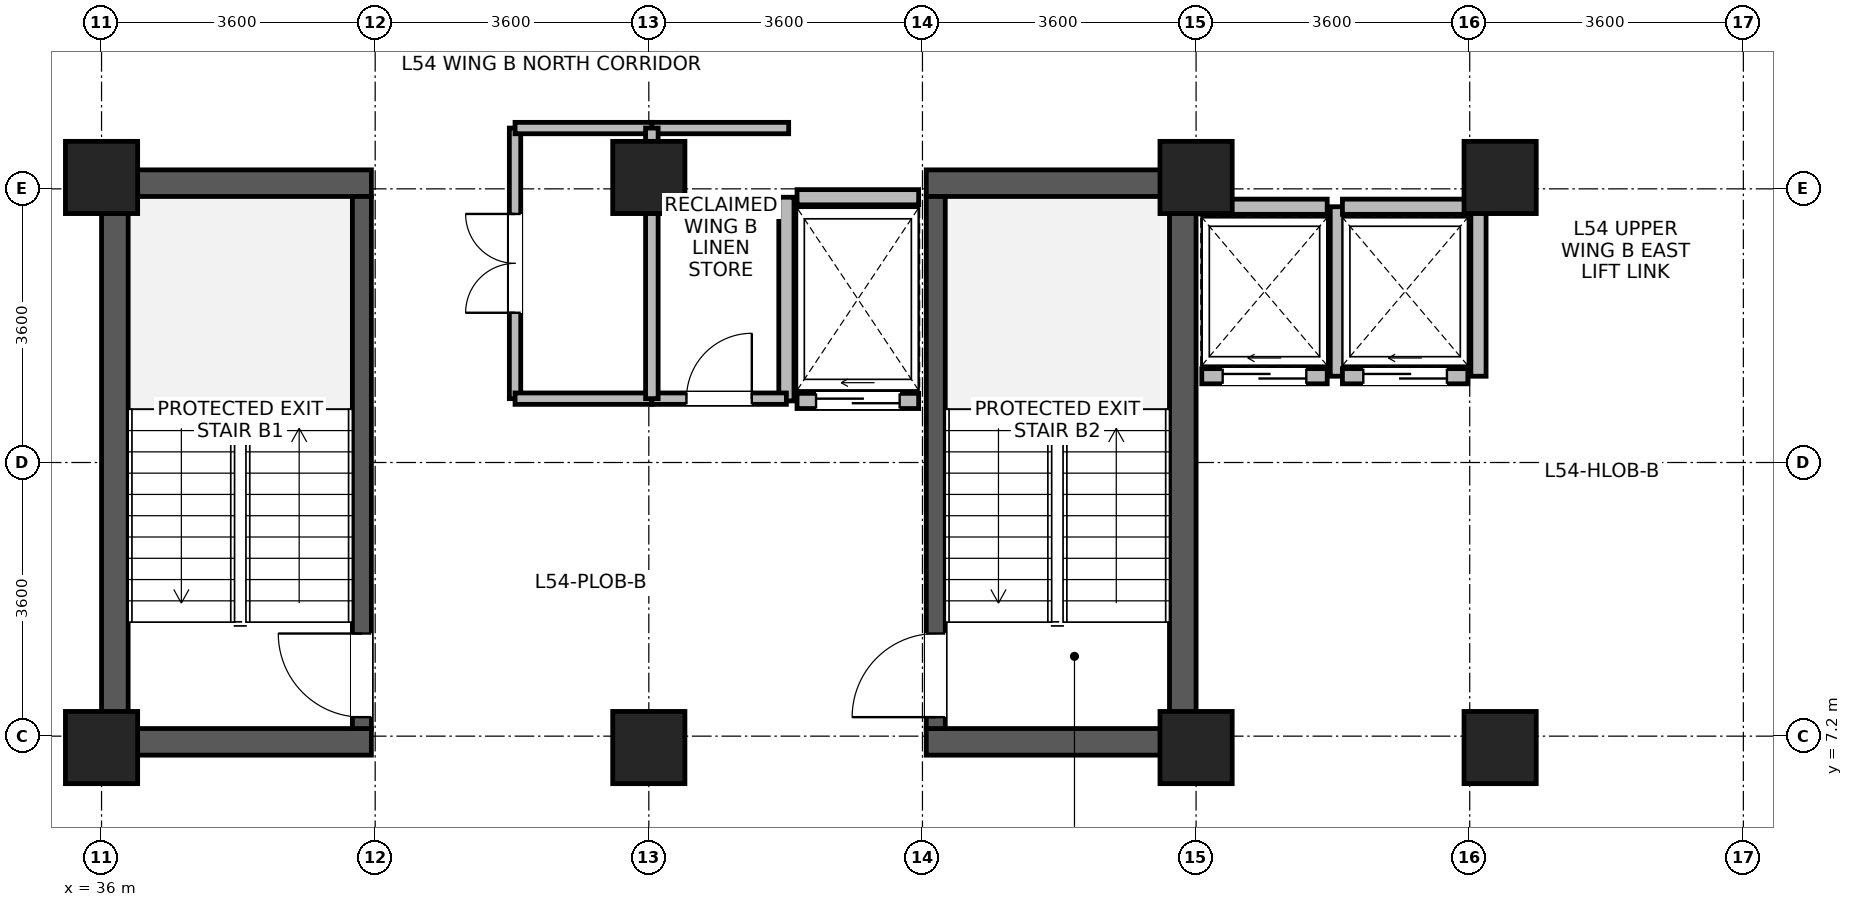
"""IFC4 building model, lengths in metres.
Left out: names, types, materials, properties, quantities, classifications, styles, units other than length and angle.
Written with IfcOpenShell. Run it as: python <this file> out.ifc"""

import sys

from ifc_helpers import new_model, si_unit, direction, frame, frame_2d, origin, origin_2d, place, context, subcontext, project, spatial, rectangle, extrude, source, transform, mapped, element, fill, save


model = new_model("IFC4")
c1 = context("Model", 3, precision=1e-05, world=origin(), true_north=direction((0.0, 1.0)))
c2 = subcontext(c1, "Body", "Model", "MODEL_VIEW")
j1 = project(units=[si_unit("LENGTHUNIT", "METRE"), si_unit("PLANEANGLEUNIT", "RADIAN")], contexts=[c1])
p1 = place(None, origin())
s1 = spatial("IfcSite", under=j1, at=p1, CompositionType="ELEMENT")
p2 = place(p1, origin())
s2 = spatial("IfcBuilding", under=s1, at=p2, CompositionType="ELEMENT")
p3 = place(p2, frame((0.0, 0.0, 212.9)))
s3 = spatial("IfcBuildingStorey", under=s2, at=p3, CompositionType="ELEMENT", Elevation=212.9)
for number, where, z_axis, x_axis in (
    (1, (36.175, 6.95, 0.0), (0.0, 0.0, 1.0), (0.0, 1.0, 0.0)),
    (2, (50.225, 6.95, 0.0), (0.0, 0.0, 1.0), (0.0, 1.0, 0.0)),
):
    element("IfcWall", number, at=place(p3, frame(where, z_axis=z_axis, x_axis=x_axis)), inside=s3, PredefinedType="SHEAR", context=c2, shape_type="SweptSolid", body=[
        extrude(rectangle(XDim=7.7, YDim=0.35, at=frame_2d((3.85, 0.0))), origin(), (0.0, 0.0, 1.0), 3.47),
    ])
for number, where, z_axis, x_axis in (
    (3, (36.35, 7.125, 0.0), (0.0, 0.0, 1.0), (1.0, 0.0, 0.0)),
    (4, (46.85, 7.125, 0.0), (0.0, 0.0, 1.0), (1.0, 0.0, 0.0)),
    (5, (36.35, 14.475, 0.0), (0.0, 0.0, 1.0), (1.0, 0.0, 0.0)),
    (6, (46.85, 14.475, 0.0), (0.0, 0.0, 1.0), (1.0, 0.0, 0.0)),
):
    element("IfcWall", number, at=place(p3, frame(where, z_axis=z_axis, x_axis=x_axis)), inside=s3, PredefinedType="SHEAR", context=c2, shape_type="SweptSolid", body=[
        extrude(rectangle(XDim=3.2, YDim=0.35, at=frame_2d((1.6, 0.0))), origin(), (0.0, 0.0, 1.0), 3.47),
    ])
p4 = place(p3, frame((39.425, 7.3, 0.0), z_axis=(0.0, 0.0, 1.0), x_axis=(0.0, 1.0, 0.0)))
e7 = element("IfcWall", 7, at=p4, inside=s3, PredefinedType="SHEAR", context=c2, shape_type="SweptSolid", body=[
    extrude(rectangle(XDim=7.0, YDim=0.25, at=frame_2d((3.5, 0.0))), origin(), (0.0, 0.0, 1.0), 3.47),
])
p5 = place(p4, frame((0.15, 0.0, 0.0)))
e8 = element("IfcOpeningElement", 8, at=p5, cuts=e7, PredefinedType="OPENING", context=c2, shape_type="SweptSolid", body=[
    extrude(rectangle(XDim=1.1, YDim=2.08, at=frame_2d((0.55, 1.04))), frame((0.0, 0.135, 0.0), z_axis=(0.0, -1.0, 0.0), x_axis=(1.0, 0.0, 0.0)), (0.0, 0.0, 1.0), 0.27),
])
p6 = place(p3, frame((46.975, 7.3, 0.0), z_axis=(0.0, 0.0, 1.0), x_axis=(0.0, 1.0, 0.0)))
e9 = element("IfcWall", 9, at=p6, inside=s3, PredefinedType="SHEAR", context=c2, shape_type="SweptSolid", body=[
    extrude(rectangle(XDim=7.0, YDim=0.25, at=frame_2d((3.5, 0.0))), origin(), (0.0, 0.0, 1.0), 3.47),
])
p7 = place(p6, frame((0.15, 0.0, 0.0)))
e10 = element("IfcOpeningElement", 10, at=p7, cuts=e9, PredefinedType="OPENING", context=c2, shape_type="SweptSolid", body=[
    extrude(rectangle(XDim=1.1, YDim=2.08, at=frame_2d((0.55, 1.04))), frame((0.0, 0.135, 0.0), z_axis=(0.0, -1.0, 0.0), x_axis=(1.0, 0.0, 0.0)), (0.0, 0.0, 1.0), 0.27),
])
m1 = source(origin(), c2, "Body", "SweptSolid", [
    extrude(rectangle(XDim=0.95, YDim=0.95, at=origin_2d()), origin(), (0.0, 0.0, 1.0), 3.7),
])
for number, where, z_axis, x_axis in (
    (11, (36.0, 7.05, 0.0), (0.0, 0.0, 1.0), (1.0, 0.0, 0.0)),
    (12, (36.0, 14.55, 0.0), (0.0, 0.0, 1.0), (1.0, 0.0, 0.0)),
    (13, (43.2, 7.05, 0.0), (0.0, 0.0, 1.0), (1.0, 0.0, 0.0)),
    (14, (43.2, 14.55, 0.0), (0.0, 0.0, 1.0), (1.0, 0.0, 0.0)),
    (15, (50.4, 7.05, 0.0), (0.0, 0.0, 1.0), (1.0, 0.0, 0.0)),
    (16, (50.4, 14.55, 0.0), (0.0, 0.0, 1.0), (1.0, 0.0, 0.0)),
    (17, (54.4, 7.05, 0.0), (0.0, 0.0, 1.0), (1.0, 0.0, 0.0)),
    (18, (54.4, 14.55, 0.0), (0.0, 0.0, 1.0), (1.0, 0.0, 0.0)),
):
    element("IfcColumn", number, at=place(p3, frame(where, z_axis=z_axis, x_axis=x_axis)), inside=s3, PredefinedType="COLUMN", context=c2, shape_type="MappedRepresentation", body=[
        mapped(m1, transform((0.0, 0.0, 0.0), x_axis=(1.0, 0.0, 0.0), y_axis=(0.0, 1.0, 0.0), z_axis=(0.0, 0.0, 1.0), scale=1.0)),
    ])
p8 = place(p3, frame((50.475, 11.935, 0.0), z_axis=(0.0, 0.0, 1.0), x_axis=(1.0, 0.0, 0.0)))
e19 = element("IfcWall", 19, at=p8, inside=s3, PredefinedType="PARTITIONING", context=c2, shape_type="SweptSolid", body=[
    extrude(rectangle(XDim=1.65, YDim=0.2, at=frame_2d((0.825, 0.0))), origin(), (0.0, 0.0, 1.0), 3.45),
])
p9 = place(p8, frame((0.275, 0.0, 0.0)))
e20 = element("IfcOpeningElement", 20, at=p9, cuts=e19, PredefinedType="OPENING", context=c2, shape_type="SweptSolid", body=[
    extrude(rectangle(XDim=1.1, YDim=2.12, at=frame_2d((0.55, 1.06))), frame((0.0, 0.11, 0.0), z_axis=(0.0, -1.0, 0.0), x_axis=(1.0, 0.0, 0.0)), (0.0, 0.0, 1.0), 0.22),
])
p10 = place(p3, frame((50.475, 14.165, 0.0), z_axis=(0.0, 0.0, 1.0), x_axis=(1.0, 0.0, 0.0)))
e21 = element("IfcWall", 21, at=p10, inside=s3, PredefinedType="PARTITIONING", context=c2, shape_type="SweptSolid", body=[
    extrude(rectangle(XDim=1.65, YDim=0.2, at=frame_2d((0.825, 0.0))), origin(), (0.0, 0.0, 1.0), 3.45),
])
p11 = place(p3, frame((52.265, 11.935, 0.0), z_axis=(0.0, 0.0, 1.0), x_axis=(0.0, 1.0, 0.0)))
e22 = element("IfcWall", 22, at=p11, inside=s3, PredefinedType="PARTITIONING", context=c2, shape_type="SweptSolid", body=[
    extrude(rectangle(XDim=2.23, YDim=0.2, at=frame_2d((1.115, 0.0))), origin(), (0.0, 0.0, 1.0), 3.45),
])
p12 = place(p3, frame((52.325, 11.935, 0.0), z_axis=(0.0, 0.0, 1.0), x_axis=(1.0, 0.0, 0.0)))
e23 = element("IfcWall", 23, at=p12, inside=s3, PredefinedType="PARTITIONING", context=c2, shape_type="SweptSolid", body=[
    extrude(rectangle(XDim=1.65, YDim=0.2, at=frame_2d((0.825, 0.0))), origin(), (0.0, 0.0, 1.0), 3.45),
])
p13 = place(p12, frame((0.275, 0.0, 0.0)))
e24 = element("IfcOpeningElement", 24, at=p13, cuts=e23, PredefinedType="OPENING", context=c2, shape_type="SweptSolid", body=[
    extrude(rectangle(XDim=1.1, YDim=2.12, at=frame_2d((0.55, 1.06))), frame((0.0, 0.11, 0.0), z_axis=(0.0, -1.0, 0.0), x_axis=(1.0, 0.0, 0.0)), (0.0, 0.0, 1.0), 0.22),
])
p14 = place(p3, frame((52.325, 14.165, 0.0), z_axis=(0.0, 0.0, 1.0), x_axis=(1.0, 0.0, 0.0)))
e25 = element("IfcWall", 25, at=p14, inside=s3, PredefinedType="PARTITIONING", context=c2, shape_type="SweptSolid", body=[
    extrude(rectangle(XDim=1.65, YDim=0.2, at=frame_2d((0.825, 0.0))), origin(), (0.0, 0.0, 1.0), 3.45),
])
p15 = place(p3, frame((54.115, 11.935, 0.0), z_axis=(0.0, 0.0, 1.0), x_axis=(0.0, 1.0, 0.0)))
e26 = element("IfcWall", 26, at=p15, inside=s3, PredefinedType="PARTITIONING", context=c2, shape_type="SweptSolid", body=[
    extrude(rectangle(XDim=2.23, YDim=0.2, at=frame_2d((1.115, 0.0))), origin(), (0.0, 0.0, 1.0), 3.45),
])
p16 = place(p3, frame((45.15, 11.61, 0.0), z_axis=(0.0, 0.0, 1.0), x_axis=(1.0, 0.0, 0.0)))
e27 = element("IfcWall", 27, at=p16, inside=s3, PredefinedType="PARTITIONING", context=c2, shape_type="SweptSolid", body=[
    extrude(rectangle(XDim=1.6, YDim=0.2, at=frame_2d((0.8, 0.0))), origin(), (0.0, 0.0, 1.0), 3.45),
])
p17 = place(p16, frame((0.25, 0.0, 0.0)))
e28 = element("IfcOpeningElement", 28, at=p17, cuts=e27, PredefinedType="OPENING", context=c2, shape_type="SweptSolid", body=[
    extrude(rectangle(XDim=1.1, YDim=2.12, at=frame_2d((0.55, 1.06))), frame((0.0, 0.11, 0.0), z_axis=(0.0, -1.0, 0.0), x_axis=(1.0, 0.0, 0.0)), (0.0, 0.0, 1.0), 0.22),
])
p18 = place(p3, frame((45.15, 14.29, 0.0), z_axis=(0.0, 0.0, 1.0), x_axis=(1.0, 0.0, 0.0)))
e29 = element("IfcWall", 29, at=p18, inside=s3, PredefinedType="PARTITIONING", context=c2, shape_type="SweptSolid", body=[
    extrude(rectangle(XDim=1.6, YDim=0.2, at=frame_2d((0.8, 0.0))), origin(), (0.0, 0.0, 1.0), 2.55),
])
p19 = place(p3, frame((45.01, 11.61, 0.0), z_axis=(0.0, 0.0, 1.0), x_axis=(0.0, 1.0, 0.0)))
e30 = element("IfcWall", 30, at=p19, inside=s3, PredefinedType="PARTITIONING", context=c2, shape_type="SweptSolid", body=[
    extrude(rectangle(XDim=2.68, YDim=0.2, at=frame_2d((1.34, 0.0))), origin(), (0.0, 0.0, 1.0), 3.45),
])
p20 = place(p3, frame((41.44, 11.64, 0.0), z_axis=(0.0, 0.0, 1.0), x_axis=(0.0, 1.0, 0.0)))
e31 = element("IfcWall", 31, at=p20, inside=s3, PredefinedType="PARTITIONING", context=c2, shape_type="SweptSolid", body=[
    extrude(rectangle(XDim=3.56, YDim=0.15, at=frame_2d((1.78, 0.0))), origin(), (0.0, 0.0, 1.0), 3.45),
])
p21 = place(p20, frame((1.13, 0.0, 0.0)))
e32 = element("IfcOpeningElement", 32, at=p21, cuts=e31, PredefinedType="OPENING", context=c2, shape_type="SweptSolid", body=[
    extrude(rectangle(XDim=1.3, YDim=2.12, at=frame_2d((0.65, 1.06))), frame((0.0, 0.085, 0.0), z_axis=(0.0, -1.0, 0.0), x_axis=(1.0, 0.0, 0.0)), (0.0, 0.0, 1.0), 0.17),
])
for number, where, z_axis, x_axis in (
    (33, (41.44, 11.64, 0.0), (0.0, 0.0, 1.0), (1.0, 0.0, 0.0)),
    (34, (41.44, 15.2, 0.0), (0.0, 0.0, 1.0), (1.0, 0.0, 0.0)),
):
    element("IfcWall", number, at=place(p3, frame(where, z_axis=z_axis, x_axis=x_axis)), inside=s3, PredefinedType="PARTITIONING", context=c2, shape_type="SweptSolid", body=[
        extrude(rectangle(XDim=1.8, YDim=0.15, at=frame_2d((0.9, 0.0))), origin(), (0.0, 0.0, 1.0), 3.45),
    ])
p22 = place(p3, frame((43.24, 11.64, 0.0), z_axis=(0.0, 0.0, 1.0), x_axis=(1.0, 0.0, 0.0)))
e35 = element("IfcWall", 35, at=p22, inside=s3, PredefinedType="PARTITIONING", context=c2, shape_type="SweptSolid", body=[
    extrude(rectangle(XDim=1.77, YDim=0.15, at=frame_2d((0.885, 0.0))), origin(), (0.0, 0.0, 1.0), 3.45),
])
p23 = place(p22, frame((0.455, 0.0, 0.0)))
e36 = element("IfcOpeningElement", 36, at=p23, cuts=e35, PredefinedType="OPENING", context=c2, shape_type="SweptSolid", body=[
    extrude(rectangle(XDim=0.86, YDim=2.02, at=frame_2d((0.43, 1.01))), frame((0.0, 0.085, 0.0), z_axis=(0.0, -1.0, 0.0), x_axis=(1.0, 0.0, 0.0)), (0.0, 0.0, 1.0), 0.17),
])
p24 = place(p3, frame((43.24, 15.2, 0.0), z_axis=(0.0, 0.0, 1.0), x_axis=(1.0, 0.0, 0.0)))
e37 = element("IfcWall", 37, at=p24, inside=s3, PredefinedType="PARTITIONING", context=c2, shape_type="SweptSolid", body=[
    extrude(rectangle(XDim=1.8, YDim=0.15, at=frame_2d((0.9, 0.0))), origin(), (0.0, 0.0, 1.0), 3.45),
])
p25 = place(p3, frame((43.24, 11.64, 0.0), z_axis=(0.0, 0.0, 1.0), x_axis=(0.0, 1.0, 0.0)))
e38 = element("IfcWall", 38, at=p25, inside=s3, PredefinedType="PARTITIONING", context=c2, shape_type="SweptSolid", body=[
    extrude(rectangle(XDim=3.56, YDim=0.165, at=frame_2d((1.78, 0.0))), origin(), (0.0, 0.0, 1.0), 3.45),
])
p26 = place(p5, origin())
e39 = element("IfcDoor", 39, at=p26, inside=s3, OperationType="SINGLE_SWING_RIGHT", PredefinedType="DOOR", context=c2, shape_type="SweptSolid", body=[
    extrude(rectangle(XDim=1.1, YDim=2.08, at=frame_2d((0.55, 1.04))), frame((0.0, 0.025, 0.0), z_axis=(0.0, -1.0, 0.0), x_axis=(1.0, 0.0, 0.0)), (0.0, 0.0, 1.0), 0.05),
])
fill(e8, e39)
p27 = place(p7, origin())
e40 = element("IfcDoor", 40, at=p27, inside=s3, OperationType="SINGLE_SWING_LEFT", PredefinedType="DOOR", context=c2, shape_type="SweptSolid", body=[
    extrude(rectangle(XDim=1.1, YDim=2.08, at=frame_2d((0.55, 1.04))), frame((0.0, 0.025, 0.0), z_axis=(0.0, -1.0, 0.0), x_axis=(1.0, 0.0, 0.0)), (0.0, 0.0, 1.0), 0.05),
])
fill(e10, e40)
p28 = place(p9, origin())
e41 = element("IfcDoor", 41, at=p28, inside=s3, OperationType="SLIDING_TO_LEFT", PredefinedType="DOOR", context=c2, shape_type="SweptSolid", body=[
    extrude(rectangle(XDim=1.1, YDim=2.12, at=frame_2d((0.55, 1.06))), frame((0.0, 0.025, 0.0), z_axis=(0.0, -1.0, 0.0), x_axis=(1.0, 0.0, 0.0)), (0.0, 0.0, 1.0), 0.05),
])
fill(e20, e41)
p29 = place(p13, origin())
e42 = element("IfcDoor", 42, at=p29, inside=s3, OperationType="SLIDING_TO_LEFT", PredefinedType="DOOR", context=c2, shape_type="SweptSolid", body=[
    extrude(rectangle(XDim=1.1, YDim=2.12, at=frame_2d((0.55, 1.06))), frame((0.0, 0.025, 0.0), z_axis=(0.0, -1.0, 0.0), x_axis=(1.0, 0.0, 0.0)), (0.0, 0.0, 1.0), 0.05),
])
fill(e24, e42)
p30 = place(p17, origin())
e43 = element("IfcDoor", 43, at=p30, inside=s3, OperationType="SLIDING_TO_LEFT", PredefinedType="DOOR", context=c2, shape_type="SweptSolid", body=[
    extrude(rectangle(XDim=1.1, YDim=2.12, at=frame_2d((0.55, 1.06))), frame((0.0, 0.025, 0.0), z_axis=(0.0, -1.0, 0.0), x_axis=(1.0, 0.0, 0.0)), (0.0, 0.0, 1.0), 0.05),
])
fill(e28, e43)
p31 = place(p21, origin())
e44 = element("IfcDoor", 44, at=p31, inside=s3, OperationType="DOUBLE_DOOR_SINGLE_SWING", PredefinedType="DOOR", context=c2, shape_type="SweptSolid", body=[
    extrude(rectangle(XDim=1.3, YDim=2.12, at=frame_2d((0.65, 1.06))), frame((0.0, 0.025, 0.0), z_axis=(0.0, -1.0, 0.0), x_axis=(1.0, 0.0, 0.0)), (0.0, 0.0, 1.0), 0.05),
])
fill(e32, e44)
p32 = place(p23, origin())
e45 = element("IfcDoor", 45, at=p32, inside=s3, OperationType="SINGLE_SWING_RIGHT", PredefinedType="DOOR", context=c2, shape_type="SweptSolid", body=[
    extrude(rectangle(XDim=0.86, YDim=2.02, at=frame_2d((0.43, 1.01))), frame((0.0, 0.025, 0.0), z_axis=(0.0, -1.0, 0.0), x_axis=(1.0, 0.0, 0.0)), (0.0, 0.0, 1.0), 0.05),
])
fill(e36, e45)
save(model, sys.argv[1])
